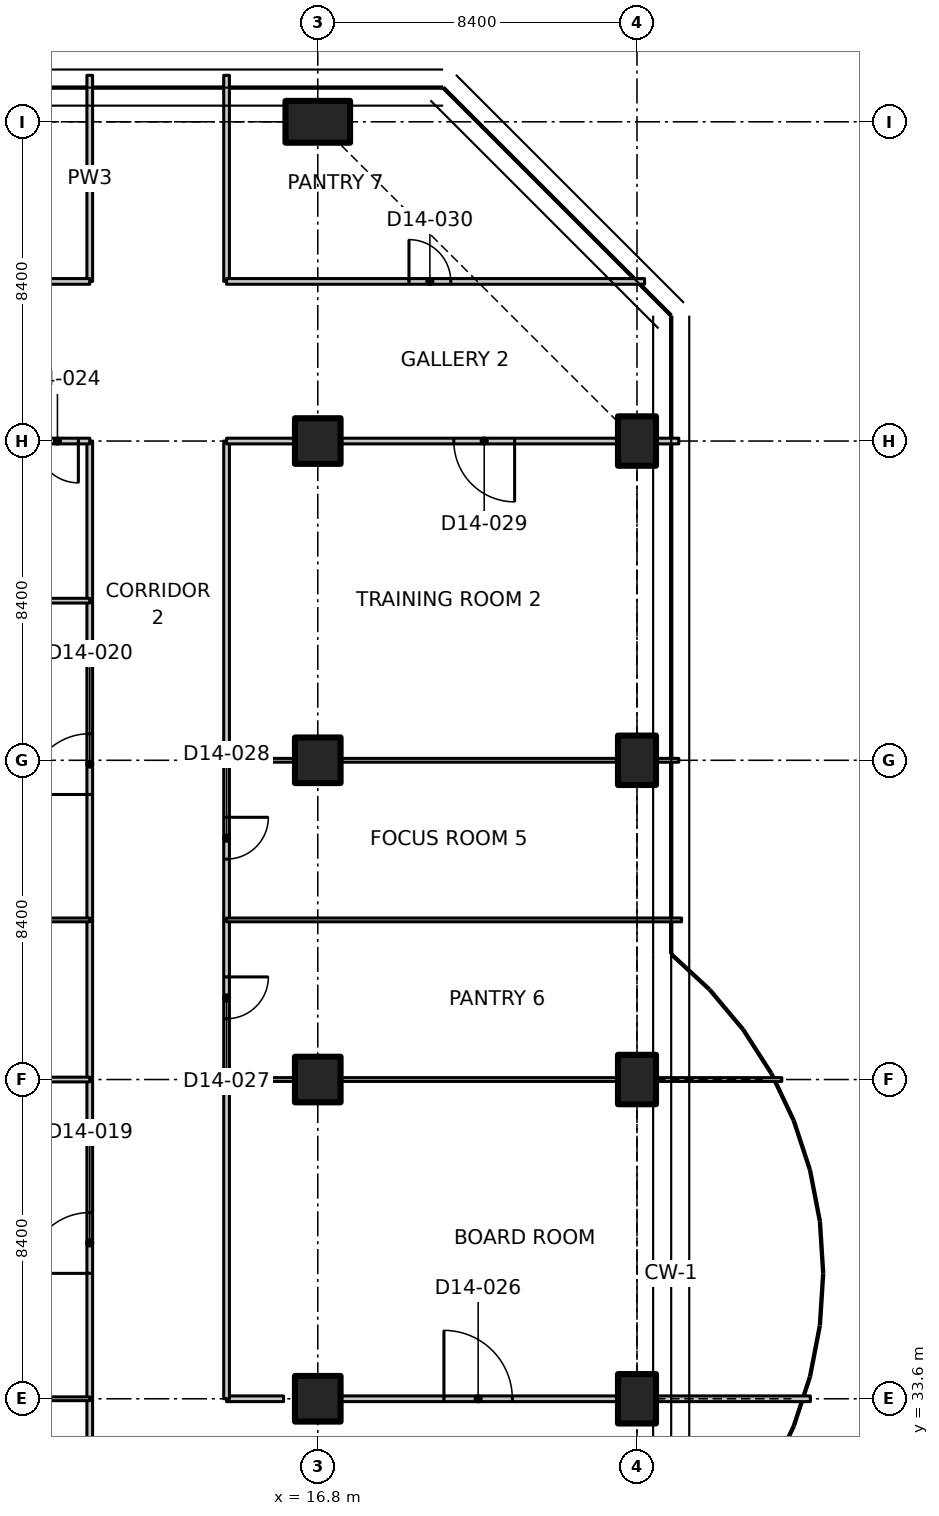
"""IFC4 building model, lengths in metres.
Left out: names, types, materials, properties, quantities, classifications, styles, units other than length and angle.
Written with IfcOpenShell. Run it as: python <this file> out.ifc"""

import sys

from ifc_helpers import new_model, si_unit, direction, frame, frame_2d, origin, origin_2d, place, context, subcontext, project, spatial, polyline, rectangle, outline, extrude, element, fill, save


model = new_model("IFC4")
c1 = context("Model", 3, precision=1e-05, world=origin(), true_north=direction((0.0, 1.0)))
c2 = subcontext(c1, "Body", "Model", "MODEL_VIEW")
j1 = project(units=[si_unit("LENGTHUNIT", "METRE"), si_unit("PLANEANGLEUNIT", "RADIAN")], contexts=[c1])
p1 = place(None, origin())
s1 = spatial("IfcSite", under=j1, at=p1, CompositionType="ELEMENT")
p2 = place(p1, origin())
s2 = spatial("IfcBuilding", under=s1, at=p2, CompositionType="ELEMENT")
p3 = place(p2, frame((0.0, 0.0, 109.7)))
s3 = spatial("IfcBuildingStorey", under=s2, at=p3, CompositionType="ELEMENT", Elevation=109.7)
for number, where, z_axis, x_axis in (
    (1, (16.8, 33.6, 0.0), (0.0, 0.0, 1.0), (1.0, 0.0, 0.0)),
    (2, (16.8, 42.0, 0.0), (0.0, 0.0, 1.0), (1.0, 0.0, 0.0)),
    (3, (16.8, 50.4, 0.0), (0.0, 0.0, 1.0), (1.0, 0.0, 0.0)),
    (4, (16.8, 58.8, 0.0), (0.0, 0.0, 1.0), (1.0, 0.0, 0.0)),
):
    element("IfcColumn", number, at=place(p3, frame(where, z_axis=z_axis, x_axis=x_axis)), inside=s3, PredefinedType="COLUMN", context=c2, shape_type="SweptSolid", body=[
        extrude(rectangle(XDim=1.2, YDim=1.2, at=origin_2d()), origin(), (0.0, 0.0, 1.0), 3.35),
    ])
p4 = place(p3, frame((16.8, 67.2, 0.0), z_axis=(0.0, 0.0, 1.0), x_axis=(0.0, 1.0, 0.0)))
e5 = element("IfcColumn", 5, at=p4, inside=s3, PredefinedType="COLUMN", context=c2, shape_type="SweptSolid", body=[
    extrude(rectangle(XDim=1.1, YDim=1.7, at=origin_2d()), origin(), (0.0, 0.0, 1.0), 3.35),
])
for number, where, z_axis, x_axis in (
    (6, (25.2, 33.6, 0.0), (0.0, 0.0, 1.0), (1.0, 0.0, 0.0)),
    (7, (25.2, 42.0, 0.0), (0.0, 0.0, 1.0), (1.0, 0.0, 0.0)),
    (8, (25.2, 50.4, 0.0), (0.0, 0.0, 1.0), (1.0, 0.0, 0.0)),
    (9, (25.2, 58.8, 0.0), (0.0, 0.0, 1.0), (1.0, 0.0, 0.0)),
):
    element("IfcColumn", number, at=place(p3, frame(where, z_axis=z_axis, x_axis=x_axis)), inside=s3, PredefinedType="COLUMN", context=c2, shape_type="SweptSolid", body=[
        extrude(rectangle(XDim=1.0, YDim=1.3, at=origin_2d()), origin(), (0.0, 0.0, 1.0), 3.35),
    ])
p5 = place(p3, frame((10.8, 25.2, 0.0), z_axis=(0.0, 0.0, 1.0), x_axis=(0.0, 1.0, 0.0)))
e10 = element("IfcWall", 10, at=p5, inside=s3, PredefinedType="PARTITIONING", context=c2, shape_type="SweptSolid", body=[
    extrude(rectangle(XDim=8.4, YDim=0.15, at=frame_2d((4.2, 0.0))), origin(), (0.0, 0.0, 1.0), 3.33),
])
p6 = place(p5, frame((3.3, 0.0, 0.0)))
e11 = element("IfcOpeningElement", 11, at=p6, cuts=e10, PredefinedType="OPENING", context=c2, shape_type="SweptSolid", body=[
    extrude(rectangle(XDim=1.6, YDim=2.1, at=frame_2d((0.8, 1.05))), frame((0.0, 0.085, 0.0), z_axis=(0.0, -1.0, 0.0), x_axis=(1.0, 0.0, 0.0)), (0.0, 0.0, 1.0), 0.17),
])
p7 = place(p3, frame((14.4, 33.6, 0.0), z_axis=(0.0, 0.0, 1.0), x_axis=(1.0, 0.0, 0.0)))
e12 = element("IfcWall", 12, at=p7, inside=s3, PredefinedType="PARTITIONING", context=c2, shape_type="SweptSolid", body=[
    extrude(rectangle(XDim=1.5, YDim=0.15, at=frame_2d((0.75, 0.0))), origin(), (0.0, 0.0, 1.0), 3.33),
])
p8 = place(p3, frame((17.42, 33.6, 0.0), z_axis=(0.0, 0.0, 1.0), x_axis=(1.0, 0.0, 0.0)))
e13 = element("IfcWall", 13, at=p8, inside=s3, PredefinedType="PARTITIONING", context=c2, shape_type="SweptSolid", body=[
    extrude(rectangle(XDim=7.26, YDim=0.15, at=frame_2d((3.63, 0.0))), origin(), (0.0, 0.0, 1.0), 3.33),
])
p9 = place(p8, frame((2.7, 0.0, 0.0)))
e14 = element("IfcOpeningElement", 14, at=p9, cuts=e13, PredefinedType="OPENING", context=c2, shape_type="SweptSolid", body=[
    extrude(rectangle(XDim=1.8, YDim=2.1, at=frame_2d((0.9, 1.05))), frame((0.0, 0.085, 0.0), z_axis=(0.0, -1.0, 0.0), x_axis=(1.0, 0.0, 0.0)), (0.0, 0.0, 1.0), 0.17),
])
p10 = place(p3, frame((25.72, 33.6, 0.0), z_axis=(0.0, 0.0, 1.0), x_axis=(1.0, 0.0, 0.0)))
e15 = element("IfcWall", 15, at=p10, inside=s3, PredefinedType="PARTITIONING", context=c2, shape_type="SweptSolid", body=[
    extrude(rectangle(XDim=4.042, YDim=0.15, at=frame_2d((2.021, 0.0))), origin(), (0.0, 0.0, 1.0), 2.98),
])
p11 = place(p3, frame((10.8, 33.6, 0.0), z_axis=(0.0, 0.0, 1.0), x_axis=(0.0, 1.0, 0.0)))
e16 = element("IfcWall", 16, at=p11, inside=s3, PredefinedType="PARTITIONING", context=c2, shape_type="SweptSolid", body=[
    extrude(rectangle(XDim=8.4, YDim=0.15, at=frame_2d((4.2, 0.0))), origin(), (0.0, 0.0, 1.0), 3.33),
])
p12 = place(p11, frame((3.3, 0.0, 0.0)))
e17 = element("IfcOpeningElement", 17, at=p12, cuts=e16, PredefinedType="OPENING", context=c2, shape_type="SweptSolid", body=[
    extrude(rectangle(XDim=1.6, YDim=2.1, at=frame_2d((0.8, 1.05))), frame((0.0, 0.085, 0.0), z_axis=(0.0, -1.0, 0.0), x_axis=(1.0, 0.0, 0.0)), (0.0, 0.0, 1.0), 0.17),
])
p13 = place(p3, frame((10.8, 46.2, 0.0), z_axis=(0.0, 0.0, 1.0), x_axis=(0.0, 1.0, 0.0)))
e18 = element("IfcWall", 18, at=p13, inside=s3, PredefinedType="PARTITIONING", context=c2, shape_type="SweptSolid", body=[
    extrude(rectangle(XDim=8.4, YDim=0.15, at=frame_2d((4.2, 0.0))), origin(), (0.0, 0.0, 1.0), 3.33),
])
p14 = place(p13, frame((3.3, 0.0, 0.0)))
e19 = element("IfcOpeningElement", 19, at=p14, cuts=e18, PredefinedType="OPENING", context=c2, shape_type="SweptSolid", body=[
    extrude(rectangle(XDim=1.6, YDim=2.1, at=frame_2d((0.8, 1.05))), frame((0.0, 0.085, 0.0), z_axis=(0.0, -1.0, 0.0), x_axis=(1.0, 0.0, 0.0)), (0.0, 0.0, 1.0), 0.17),
])
for number, where, z_axis, x_axis in (
    (20, (10.8, 42.0, 0.0), (0.0, 0.0, 1.0), (0.0, 1.0, 0.0)),
    (21, (10.8, 54.6, 0.0), (0.0, 0.0, 1.0), (0.0, 1.0, 0.0)),
):
    element("IfcWall", number, at=place(p3, frame(where, z_axis=z_axis, x_axis=x_axis)), inside=s3, PredefinedType="PARTITIONING", context=c2, shape_type="SweptSolid", body=[
        extrude(rectangle(XDim=4.2, YDim=0.15, at=frame_2d((2.1, 0.0))), origin(), (0.0, 0.0, 1.0), 3.33),
    ])
p15 = place(p3, frame((10.8, 63.0, 0.0), z_axis=(0.0, 0.0, 1.0), x_axis=(0.0, 1.0, 0.0)))
e22 = element("IfcWall", 22, at=p15, inside=s3, PredefinedType="PARTITIONING", context=c2, shape_type="SweptSolid", body=[
    extrude(outline(polyline([(0.0, 0.0), (5.423, 0.0), (5.423, 3.33), (5.28, 3.33), (4.65, 3.33), (4.648, 2.98), (3.752, 2.98), (3.75, 3.33), (0.0, 3.33), (0.0, 0.0)])), frame((0.0, 0.075, 0.0), z_axis=(0.0, -1.0, 0.0), x_axis=(1.0, 0.0, 0.0)), (0.0, 0.0, 1.0), 0.15),
])
p16 = place(p3, frame((14.4, 42.0, 0.0), z_axis=(0.0, 0.0, 1.0), x_axis=(0.0, -1.0, 0.0)))
e23 = element("IfcWall", 23, at=p16, inside=s3, PredefinedType="PARTITIONING", context=c2, shape_type="SweptSolid", body=[
    extrude(rectangle(XDim=8.4, YDim=0.15, at=frame_2d((4.2, 0.0))), origin(), (0.0, 0.0, 1.0), 3.33),
])
p17 = place(p3, frame((14.4, 46.2, 0.0), z_axis=(0.0, 0.0, 1.0), x_axis=(0.0, -1.0, 0.0)))
e24 = element("IfcWall", 24, at=p17, inside=s3, PredefinedType="PARTITIONING", context=c2, shape_type="SweptSolid", body=[
    extrude(rectangle(XDim=4.2, YDim=0.15, at=frame_2d((2.1, 0.0))), origin(), (0.0, 0.0, 1.0), 3.33),
])
p18 = place(p17, frame((1.5, 0.0, 0.0)))
e25 = element("IfcOpeningElement", 25, at=p18, cuts=e24, PredefinedType="OPENING", context=c2, shape_type="SweptSolid", body=[
    extrude(rectangle(XDim=1.1, YDim=2.1, at=frame_2d((0.55, 1.05))), frame((0.0, 0.085, 0.0), z_axis=(0.0, -1.0, 0.0), x_axis=(1.0, 0.0, 0.0)), (0.0, 0.0, 1.0), 0.17),
])
p19 = place(p3, frame((14.4, 50.4, 0.0), z_axis=(0.0, 0.0, 1.0), x_axis=(0.0, -1.0, 0.0)))
e26 = element("IfcWall", 26, at=p19, inside=s3, PredefinedType="PARTITIONING", context=c2, shape_type="SweptSolid", body=[
    extrude(rectangle(XDim=4.2, YDim=0.15, at=frame_2d((2.1, 0.0))), origin(), (0.0, 0.0, 1.0), 3.33),
])
p20 = place(p19, frame((1.5, 0.0, 0.0)))
e27 = element("IfcOpeningElement", 27, at=p20, cuts=e26, PredefinedType="OPENING", context=c2, shape_type="SweptSolid", body=[
    extrude(rectangle(XDim=1.1, YDim=2.1, at=frame_2d((0.55, 1.05))), frame((0.0, 0.085, 0.0), z_axis=(0.0, -1.0, 0.0), x_axis=(1.0, 0.0, 0.0)), (0.0, 0.0, 1.0), 0.17),
])
p21 = place(p3, frame((14.4, 58.8, 0.0), z_axis=(0.0, 0.0, 1.0), x_axis=(0.0, -1.0, 0.0)))
e28 = element("IfcWall", 28, at=p21, inside=s3, PredefinedType="PARTITIONING", context=c2, shape_type="SweptSolid", body=[
    extrude(rectangle(XDim=8.4, YDim=0.15, at=frame_2d((4.2, 0.0))), origin(), (0.0, 0.0, 1.0), 3.33),
])
p22 = place(p3, frame((14.4, 68.423, 0.0), z_axis=(0.0, 0.0, 1.0), x_axis=(0.0, -1.0, 0.0)))
e29 = element("IfcWall", 29, at=p22, inside=s3, PredefinedType="PARTITIONING", context=c2, shape_type="SweptSolid", body=[
    extrude(outline(polyline([(0.0, 0.0), (5.423, 0.0), (5.423, 3.33), (1.673, 3.33), (1.671, 2.98), (0.775, 2.98), (0.773, 3.33), (0.143, 3.33), (0.0, 3.33), (0.0, 0.0)])), frame((0.0, 0.075, 0.0), z_axis=(0.0, -1.0, 0.0), x_axis=(1.0, 0.0, 0.0)), (0.0, 0.0, 1.0), 0.15),
])
p23 = place(p3, frame((10.8, 58.8, 0.0), z_axis=(0.0, 0.0, 1.0), x_axis=(-1.0, 0.0, 0.0)))
e30 = element("IfcWall", 30, at=p23, inside=s3, PredefinedType="PARTITIONING", context=c2, shape_type="SweptSolid", body=[
    extrude(rectangle(XDim=1.78, YDim=0.15, at=frame_2d((0.89, 0.0))), origin(), (0.0, 0.0, 1.0), 3.33),
])
p24 = place(p23, frame((0.3, 0.0, 0.0)))
e31 = element("IfcOpeningElement", 31, at=p24, cuts=e30, PredefinedType="OPENING", context=c2, shape_type="SweptSolid", body=[
    extrude(rectangle(XDim=1.1, YDim=2.1, at=frame_2d((0.55, 1.05))), frame((0.0, 0.085, 0.0), z_axis=(0.0, -1.0, 0.0), x_axis=(1.0, 0.0, 0.0)), (0.0, 0.0, 1.0), 0.17),
])
p25 = place(p3, frame((-0.2, 63.0, 0.0), z_axis=(0.0, 0.0, 1.0), x_axis=(1.0, 0.0, 0.0)))
e32 = element("IfcWall", 32, at=p25, inside=s3, PredefinedType="PARTITIONING", context=c2, shape_type="SweptSolid", body=[
    extrude(outline(polyline([(0.0, 0.0), (11.0, 0.0), (11.0, 3.33), (5.091, 3.33), (5.089, 2.98), (3.711, 2.98), (3.709, 3.33), (0.0, 3.33), (0.0, 0.0)])), frame((0.0, 0.075, 0.0), z_axis=(0.0, -1.0, 0.0), x_axis=(1.0, 0.0, 0.0)), (0.0, 0.0, 1.0), 0.15),
])
p26 = place(p25, frame((5.0, 0.0, 0.0)))
e33 = element("IfcOpeningElement", 33, at=p26, cuts=e32, PredefinedType="OPENING", context=c2, shape_type="SweptSolid", body=[
    extrude(rectangle(XDim=1.1, YDim=2.1, at=frame_2d((0.55, 1.05))), frame((0.0, 0.085, 0.0), z_axis=(0.0, -1.0, 0.0), x_axis=(1.0, 0.0, 0.0)), (0.0, 0.0, 1.0), 0.17),
])
p27 = place(p3, frame((9.02, 33.6, 0.0), z_axis=(0.0, 0.0, 1.0), x_axis=(1.0, 0.0, 0.0)))
e34 = element("IfcWall", 34, at=p27, inside=s3, PredefinedType="PARTITIONING", context=c2, shape_type="SweptSolid", body=[
    extrude(rectangle(XDim=1.78, YDim=0.1, at=frame_2d((0.89, 0.0))), origin(), (0.0, 0.0, 1.0), 3.33),
])
p28 = place(p3, frame((9.02, 42.0, 0.0), z_axis=(0.0, 0.0, 1.0), x_axis=(1.0, 0.0, 0.0)))
e35 = element("IfcWall", 35, at=p28, inside=s3, PredefinedType="PARTITIONING", context=c2, shape_type="SweptSolid", body=[
    extrude(rectangle(XDim=1.78, YDim=0.125, at=frame_2d((0.89, 0.0))), origin(), (0.0, 0.0, 1.0), 3.33),
])
p29 = place(p3, frame((10.8, 46.2, 0.0), z_axis=(0.0, 0.0, 1.0), x_axis=(-1.0, 0.0, 0.0)))
e36 = element("IfcWall", 36, at=p29, inside=s3, PredefinedType="PARTITIONING", context=c2, shape_type="SweptSolid", body=[
    extrude(rectangle(XDim=6.0, YDim=0.1, at=frame_2d((3.0, 0.0))), origin(), (0.0, 0.0, 1.0), 3.33),
])
p30 = place(p29, frame((2.4, 0.0, 0.0)))
e37 = element("IfcOpeningElement", 37, at=p30, cuts=e36, PredefinedType="OPENING", context=c2, shape_type="SweptSolid", body=[
    extrude(rectangle(XDim=1.0, YDim=2.1, at=frame_2d((0.5, 1.05))), frame((0.0, 0.06, 0.0), z_axis=(0.0, -1.0, 0.0), x_axis=(1.0, 0.0, 0.0)), (0.0, 0.0, 1.0), 0.12),
])
p31 = place(p3, frame((-1.174, 54.6, 0.0), z_axis=(0.0, 0.0, 1.0), x_axis=(1.0, 0.0, 0.0)))
e38 = element("IfcWall", 38, at=p31, inside=s3, PredefinedType="PARTITIONING", context=c2, shape_type="SweptSolid", body=[
    extrude(outline(polyline([(0.0, 0.0), (11.974, 0.0), (11.974, 3.33), (1.624, 3.33), (1.622, 2.98), (0.726, 2.98), (0.724, 3.33), (0.074, 3.33), (0.0, 3.33), (0.0, 0.0)])), frame((0.0, 0.062, 0.0), z_axis=(0.0, -1.0, 0.0), x_axis=(1.0, 0.0, 0.0)), (0.0, 0.0, 1.0), 0.125),
])
p32 = place(p3, frame((26.3, 58.8, 0.0), z_axis=(0.0, 0.0, 1.0), x_axis=(-1.0, 0.0, 0.0)))
e39 = element("IfcWall", 39, at=p32, inside=s3, PredefinedType="PARTITIONING", context=c2, shape_type="SweptSolid", body=[
    extrude(rectangle(XDim=0.58, YDim=0.15, at=frame_2d((0.29, 0.0))), origin(), (0.0, 0.0, 1.0), 3.33),
])
p33 = place(p3, frame((24.68, 58.8, 0.0), z_axis=(0.0, 0.0, 1.0), x_axis=(-1.0, 0.0, 0.0)))
e40 = element("IfcWall", 40, at=p33, inside=s3, PredefinedType="PARTITIONING", context=c2, shape_type="SweptSolid", body=[
    extrude(outline(polyline([(0.0, 0.0), (7.26, 0.0), (7.26, 3.33), (0.171, 3.33), (0.169, 2.98), (0.0, 2.98), (0.0, 0.0)])), frame((0.0, 0.075, 0.0), z_axis=(0.0, -1.0, 0.0), x_axis=(1.0, 0.0, 0.0)), (0.0, 0.0, 1.0), 0.15),
])
p34 = place(p33, frame((2.7, 0.0, 0.0)))
e41 = element("IfcOpeningElement", 41, at=p34, cuts=e40, PredefinedType="OPENING", context=c2, shape_type="SweptSolid", body=[
    extrude(rectangle(XDim=1.6, YDim=2.1, at=frame_2d((0.8, 1.05))), frame((0.0, 0.085, 0.0), z_axis=(0.0, -1.0, 0.0), x_axis=(1.0, 0.0, 0.0)), (0.0, 0.0, 1.0), 0.17),
])
p35 = place(p3, frame((16.18, 58.8, 0.0), z_axis=(0.0, 0.0, 1.0), x_axis=(-1.0, 0.0, 0.0)))
e42 = element("IfcWall", 42, at=p35, inside=s3, PredefinedType="PARTITIONING", context=c2, shape_type="SweptSolid", body=[
    extrude(rectangle(XDim=1.78, YDim=0.15, at=frame_2d((0.89, 0.0))), origin(), (0.0, 0.0, 1.0), 3.33),
])
p36 = place(p3, frame((14.4, 63.0, 0.0), z_axis=(0.0, 0.0, 1.0), x_axis=(1.0, 0.0, 0.0)))
e43 = element("IfcWall", 43, at=p36, inside=s3, PredefinedType="PARTITIONING", context=c2, shape_type="SweptSolid", body=[
    extrude(outline(polyline([(0.0, 0.0), (11.0, 0.0), (11.0, 3.33), (7.291, 3.33), (7.289, 2.98), (5.911, 2.98), (5.909, 3.33), (0.0, 3.33), (0.0, 0.0)])), frame((0.0, 0.075, 0.0), z_axis=(0.0, -1.0, 0.0), x_axis=(1.0, 0.0, 0.0)), (0.0, 0.0, 1.0), 0.15),
])
p37 = place(p36, frame((4.8, 0.0, 0.0)))
e44 = element("IfcOpeningElement", 44, at=p37, cuts=e43, PredefinedType="OPENING", context=c2, shape_type="SweptSolid", body=[
    extrude(rectangle(XDim=1.1, YDim=2.1, at=frame_2d((0.55, 1.05))), frame((0.0, 0.085, 0.0), z_axis=(0.0, -1.0, 0.0), x_axis=(1.0, 0.0, 0.0)), (0.0, 0.0, 1.0), 0.17),
])
p38 = place(p3, frame((14.4, 42.0, 0.0), z_axis=(0.0, 0.0, 1.0), x_axis=(1.0, 0.0, 0.0)))
e45 = element("IfcWall", 45, at=p38, inside=s3, PredefinedType="PARTITIONING", context=c2, shape_type="SweptSolid", body=[
    extrude(rectangle(XDim=1.78, YDim=0.1, at=frame_2d((0.89, 0.0))), origin(), (0.0, 0.0, 1.0), 3.33),
])
p39 = place(p3, frame((17.42, 42.0, 0.0), z_axis=(0.0, 0.0, 1.0), x_axis=(1.0, 0.0, 0.0)))
e46 = element("IfcWall", 46, at=p39, inside=s3, PredefinedType="PARTITIONING", context=c2, shape_type="SweptSolid", body=[
    extrude(rectangle(XDim=7.26, YDim=0.1, at=frame_2d((3.63, 0.0))), origin(), (0.0, 0.0, 1.0), 3.33),
])
p40 = place(p3, frame((25.72, 42.0, 0.0), z_axis=(0.0, 0.0, 1.0), x_axis=(1.0, 0.0, 0.0)))
e47 = element("IfcWall", 47, at=p40, inside=s3, PredefinedType="PARTITIONING", context=c2, shape_type="SweptSolid", body=[
    extrude(rectangle(XDim=3.292, YDim=0.1, at=frame_2d((1.646, 0.0))), origin(), (0.0, 0.0, 1.0), 2.98),
])
p41 = place(p3, frame((14.4, 46.2, 0.0), z_axis=(0.0, 0.0, 1.0), x_axis=(1.0, 0.0, 0.0)))
e48 = element("IfcWall", 48, at=p41, inside=s3, PredefinedType="PARTITIONING", context=c2, shape_type="SweptSolid", body=[
    extrude(outline(polyline([(0.0, 0.0), (11.974, 0.0), (11.974, 3.33), (11.9, 3.33), (11.25, 3.33), (11.248, 2.98), (10.352, 2.98), (10.35, 3.33), (0.0, 3.33), (0.0, 0.0)])), frame((0.0, 0.05, 0.0), z_axis=(0.0, -1.0, 0.0), x_axis=(1.0, 0.0, 0.0)), (0.0, 0.0, 1.0), 0.1),
])
p42 = place(p3, frame((14.4, 50.4, 0.0), z_axis=(0.0, 0.0, 1.0), x_axis=(1.0, 0.0, 0.0)))
e49 = element("IfcWall", 49, at=p42, inside=s3, PredefinedType="PARTITIONING", context=c2, shape_type="SweptSolid", body=[
    extrude(rectangle(XDim=1.78, YDim=0.1, at=frame_2d((0.89, 0.0))), origin(), (0.0, 0.0, 1.0), 3.33),
])
p43 = place(p3, frame((17.42, 50.4, 0.0), z_axis=(0.0, 0.0, 1.0), x_axis=(1.0, 0.0, 0.0)))
e50 = element("IfcWall", 50, at=p43, inside=s3, PredefinedType="PARTITIONING", context=c2, shape_type="SweptSolid", body=[
    extrude(rectangle(XDim=7.26, YDim=0.1, at=frame_2d((3.63, 0.0))), origin(), (0.0, 0.0, 1.0), 3.33),
])
p44 = place(p3, frame((25.72, 50.4, 0.0), z_axis=(0.0, 0.0, 1.0), x_axis=(1.0, 0.0, 0.0)))
e51 = element("IfcWall", 51, at=p44, inside=s3, PredefinedType="PARTITIONING", context=c2, shape_type="SweptSolid", body=[
    extrude(rectangle(XDim=0.58, YDim=0.1, at=frame_2d((0.29, 0.0))), origin(), (0.0, 0.0, 1.0), 3.33),
])
p45 = place(p12, origin())
e52 = element("IfcDoor", 52, at=p45, inside=s3, OperationType="DOUBLE_DOOR_SINGLE_SWING", PredefinedType="DOOR", context=c2, shape_type="SweptSolid", body=[
    extrude(rectangle(XDim=1.6, YDim=2.1, at=frame_2d((0.8, 1.05))), frame((0.0, 0.025, 0.0), z_axis=(0.0, -1.0, 0.0), x_axis=(1.0, 0.0, 0.0)), (0.0, 0.0, 1.0), 0.05),
])
fill(e17, e52)
p46 = place(p14, origin())
e53 = element("IfcDoor", 53, at=p46, inside=s3, OperationType="DOUBLE_DOOR_SINGLE_SWING", PredefinedType="DOOR", context=c2, shape_type="SweptSolid", body=[
    extrude(rectangle(XDim=1.6, YDim=2.1, at=frame_2d((0.8, 1.05))), frame((0.0, 0.025, 0.0), z_axis=(0.0, -1.0, 0.0), x_axis=(1.0, 0.0, 0.0)), (0.0, 0.0, 1.0), 0.05),
])
fill(e19, e53)
p47 = place(p24, origin())
e54 = element("IfcDoor", 54, at=p47, inside=s3, OperationType="SINGLE_SWING_LEFT", PredefinedType="DOOR", context=c2, shape_type="SweptSolid", body=[
    extrude(rectangle(XDim=1.1, YDim=2.1, at=frame_2d((0.55, 1.05))), frame((0.0, 0.025, 0.0), z_axis=(0.0, -1.0, 0.0), x_axis=(1.0, 0.0, 0.0)), (0.0, 0.0, 1.0), 0.05),
])
fill(e31, e54)
p48 = place(p9, origin())
e55 = element("IfcDoor", 55, at=p48, inside=s3, OperationType="DOUBLE_DOOR_SINGLE_SWING", PredefinedType="DOOR", context=c2, shape_type="SweptSolid", body=[
    extrude(rectangle(XDim=1.8, YDim=2.1, at=frame_2d((0.9, 1.05))), frame((0.0, 0.025, 0.0), z_axis=(0.0, -1.0, 0.0), x_axis=(1.0, 0.0, 0.0)), (0.0, 0.0, 1.0), 0.05),
])
fill(e14, e55)
p49 = place(p18, origin())
e56 = element("IfcDoor", 56, at=p49, inside=s3, OperationType="SINGLE_SWING_LEFT", PredefinedType="DOOR", context=c2, shape_type="SweptSolid", body=[
    extrude(rectangle(XDim=1.1, YDim=2.1, at=frame_2d((0.55, 1.05))), frame((0.0, 0.025, 0.0), z_axis=(0.0, -1.0, 0.0), x_axis=(1.0, 0.0, 0.0)), (0.0, 0.0, 1.0), 0.05),
])
fill(e25, e56)
p50 = place(p20, origin())
e57 = element("IfcDoor", 57, at=p50, inside=s3, OperationType="SINGLE_SWING_LEFT", PredefinedType="DOOR", context=c2, shape_type="SweptSolid", body=[
    extrude(rectangle(XDim=1.1, YDim=2.1, at=frame_2d((0.55, 1.05))), frame((0.0, 0.025, 0.0), z_axis=(0.0, -1.0, 0.0), x_axis=(1.0, 0.0, 0.0)), (0.0, 0.0, 1.0), 0.05),
])
fill(e27, e57)
p51 = place(p34, origin())
e58 = element("IfcDoor", 58, at=p51, inside=s3, OperationType="DOUBLE_DOOR_SINGLE_SWING", PredefinedType="DOOR", context=c2, shape_type="SweptSolid", body=[
    extrude(rectangle(XDim=1.6, YDim=2.1, at=frame_2d((0.8, 1.05))), frame((0.0, 0.025, 0.0), z_axis=(0.0, -1.0, 0.0), x_axis=(1.0, 0.0, 0.0)), (0.0, 0.0, 1.0), 0.05),
])
fill(e41, e58)
p52 = place(p37, origin())
e59 = element("IfcDoor", 59, at=p52, inside=s3, OperationType="SINGLE_SWING_LEFT", PredefinedType="DOOR", context=c2, shape_type="SweptSolid", body=[
    extrude(rectangle(XDim=1.1, YDim=2.1, at=frame_2d((0.55, 1.05))), frame((0.0, 0.025, 0.0), z_axis=(0.0, -1.0, 0.0), x_axis=(1.0, 0.0, 0.0)), (0.0, 0.0, 1.0), 0.05),
])
fill(e44, e59)
save(model, sys.argv[1])
